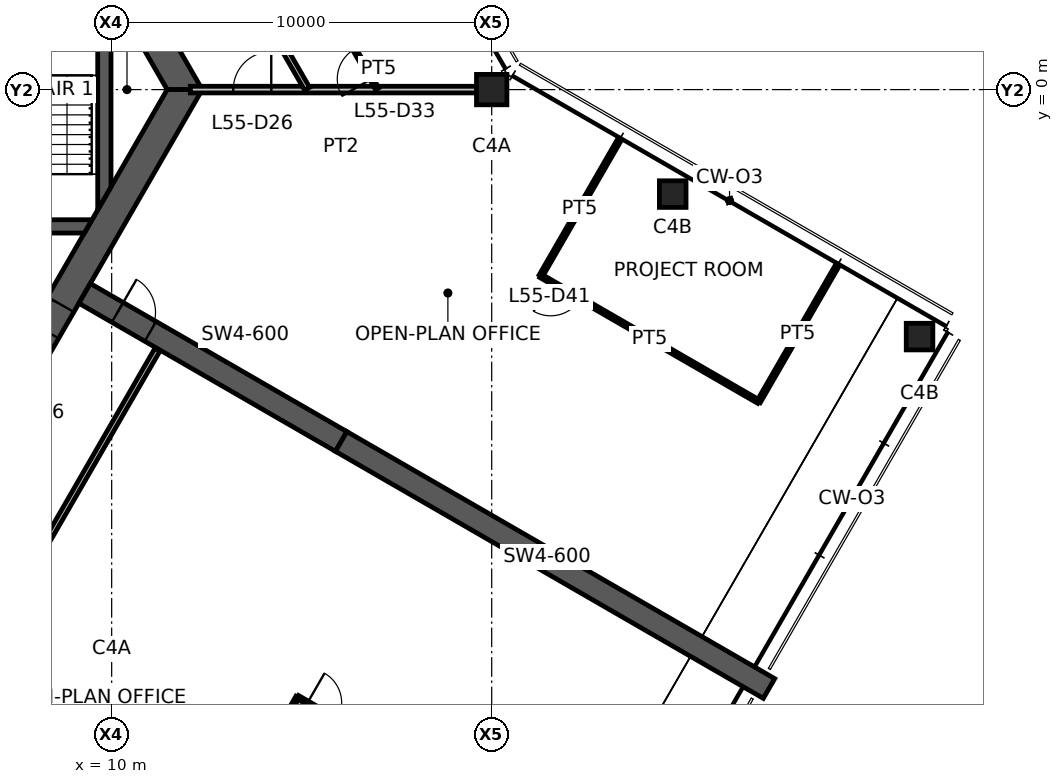
"""IFC4 building model, lengths in metres.
Left out: names, types, materials, properties, quantities, classifications, styles, units other than length and angle.
Written with IfcOpenShell. Run it as: python <this file> out.ifc"""

import sys

from ifc_helpers import new_model, si_unit, direction, frame, frame_2d, origin, origin_2d, place, context, subcontext, project, spatial, polyline, rectangle, hollow_rectangle, outline, extrude, element, fill, save


model = new_model("IFC4")
c1 = context("Model", 3, precision=1e-05, world=origin(), true_north=direction((0.0, 1.0)))
c2 = subcontext(c1, "Body", "Model", "MODEL_VIEW")
j1 = project(units=[si_unit("LENGTHUNIT", "METRE"), si_unit("PLANEANGLEUNIT", "RADIAN")], contexts=[c1])
p1 = place(None, origin())
s1 = spatial("IfcSite", under=j1, at=p1, CompositionType="ELEMENT")
p2 = place(p1, origin())
s2 = spatial("IfcBuilding", under=s1, at=p2, CompositionType="ELEMENT")
p3 = place(p2, frame((0.0, 0.0, 220.6)))
s3 = spatial("IfcBuildingStorey", under=s2, at=p3, CompositionType="ELEMENT", Elevation=220.6)
p4 = place(p3, frame((20.0, 0.0, 0.0), z_axis=(0.0, 0.0, 1.0), x_axis=(1.0, 0.0, 0.0)))
e1 = element("IfcColumn", 1, at=p4, inside=s3, PredefinedType="COLUMN", context=c2, shape_type="SweptSolid", body=[
    extrude(hollow_rectangle(XDim=0.8, YDim=0.8, WallThickness=0.04, at=origin_2d()), origin(), (0.0, 0.0, 1.0), 3.9),
])
for number, where, z_axis, x_axis in (
    (2, (24.763, -2.75, 0.0), (0.0, 0.0, 1.0), (1.0, 0.0, 0.0)),
    (3, (31.258, -6.5, 0.0), (0.0, 0.0, 1.0), (1.0, 0.0, 0.0)),
):
    element("IfcColumn", number, at=place(p3, frame(where, z_axis=z_axis, x_axis=x_axis)), inside=s3, PredefinedType="COLUMN", context=c2, shape_type="SweptSolid", body=[
        extrude(hollow_rectangle(XDim=0.7, YDim=0.7, WallThickness=0.032, at=origin_2d()), origin(), (0.0, 0.0, 1.0), 3.9),
    ])
p5 = place(p3, frame((11.922, 0.0, 0.0), z_axis=(0.0, 0.0, 1.0), x_axis=(-0.500004296715, 0.866022923061, 0.0)))
e4 = element("IfcWall", 4, at=p5, inside=s3, PredefinedType="SHEAR", context=c2, shape_type="SweptSolid", body=[
    extrude(outline(polyline([(-0.231, -0.4), (5.835, -0.4), (6.635, -0.4), (12.153, -0.4), (11.691, 0.4), (6.635, 0.4), (5.835, 0.4), (0.231, 0.4), (-0.231, -0.4)])), origin(), (0.0, 0.0, 1.0), 3.9),
])
p6 = place(p5, frame((5.835, 0.0, 0.0)))
e5 = element("IfcOpeningElement", 5, at=p6, cuts=e4, PredefinedType="OPENING", context=c2, shape_type="SweptSolid", body=[
    extrude(rectangle(XDim=0.8, YDim=2.1, at=frame_2d((0.4, 1.05))), frame((0.0, 0.41, 0.0), z_axis=(0.0, -1.0, 0.0), x_axis=(1.0, 0.0, 0.0)), (0.0, 0.0, 1.0), 0.82),
])
p7 = place(p3, frame((5.961, -10.325, 0.0), z_axis=(0.0, 0.0, 1.0), x_axis=(0.500004296715, 0.866022923061, 0.0)))
e6 = element("IfcWall", 6, at=p7, inside=s3, PredefinedType="SHEAR", context=c2, shape_type="SweptSolid", body=[
    extrude(outline(polyline([(-0.231, -0.4), (4.594, -0.4), (5.394, -0.4), (12.153, -0.4), (11.691, 0.4), (5.394, 0.4), (4.594, 0.4), (0.231, 0.4), (-0.231, -0.4)])), origin(), (0.0, 0.0, 1.0), 3.9),
])
p8 = place(p7, frame((4.594, 0.0, 0.0)))
e7 = element("IfcOpeningElement", 7, at=p8, cuts=e6, PredefinedType="OPENING", context=c2, shape_type="SweptSolid", body=[
    extrude(rectangle(XDim=0.8, YDim=2.1, at=frame_2d((0.4, 1.05))), frame((0.0, 0.41, 0.0), z_axis=(0.0, -1.0, 0.0), x_axis=(1.0, 0.0, 0.0)), (0.0, 0.0, 1.0), 0.82),
])
p9 = place(p3, frame((9.288, -5.363, 0.0), z_axis=(0.0, 0.0, 1.0), x_axis=(0.866031736626, -0.499989031036, 0.0)))
e8 = element("IfcWall", 8, at=p9, inside=s3, PredefinedType="SHEAR", context=c2, shape_type="SweptSolid", body=[
    extrude(rectangle(XDim=7.796, YDim=0.6, at=frame_2d((3.898, 0.0))), origin(), (0.0, 0.0, 1.0), 3.9),
])
p10 = place(p9, frame((1.0, 0.0, 0.0)))
e9 = element("IfcOpeningElement", 9, at=p10, cuts=e8, PredefinedType="OPENING", context=c2, shape_type="SweptSolid", body=[
    extrude(rectangle(XDim=1.0, YDim=2.1, at=frame_2d((0.5, 1.05))), frame((0.0, 0.31, 0.0), z_axis=(0.0, -1.0, 0.0), x_axis=(1.0, 0.0, 0.0)), (0.0, 0.0, 1.0), 0.62),
])
p11 = place(p3, frame((16.039, -9.26, 0.0), z_axis=(0.0, 0.0, 1.0), x_axis=(0.866024837091, -0.50000098154, 0.0)))
e10 = element("IfcWall", 10, at=p11, inside=s3, PredefinedType="SHEAR", context=c2, shape_type="SweptSolid", body=[
    extrude(rectangle(XDim=13.0, YDim=0.6, at=frame_2d((6.5, 0.0))), origin(), (0.0, 0.0, 1.0), 3.9),
])
p12 = place(p3, frame((1.425, -3.6, 0.0), z_axis=(0.0, 0.0, 1.0), x_axis=(1.0, 0.0, 0.0)))
e11 = element("IfcWall", 11, at=p12, inside=s3, PredefinedType="SHEAR", context=c2, shape_type="SweptSolid", body=[
    extrude(outline(polyline([(0.0, -0.175), (1.075, -0.175), (2.175, -0.175), (7.856, -0.175), (8.058, 0.175), (2.175, 0.175), (1.075, 0.175), (0.0, 0.175), (0.0, -0.175)])), origin(), (0.0, 0.0, 1.0), 3.9),
])
p13 = place(p12, frame((1.075, 0.0, 0.0)))
e12 = element("IfcOpeningElement", 12, at=p13, cuts=e11, PredefinedType="OPENING", context=c2, shape_type="SweptSolid", body=[
    extrude(rectangle(XDim=1.1, YDim=2.1, at=frame_2d((0.55, 1.05))), frame((0.0, 0.185, 0.0), z_axis=(0.0, -1.0, 0.0), x_axis=(1.0, 0.0, 0.0)), (0.0, 0.0, 1.0), 0.37),
])
p14 = place(p3, frame((9.808, -2.862, 0.0), z_axis=(0.0, 0.0, 1.0), x_axis=(0.0, 1.0, 0.0)))
e13 = element("IfcWall", 13, at=p14, inside=s3, PredefinedType="SHEAR", context=c2, shape_type="SweptSolid", body=[
    extrude(outline(polyline([(0.303, -0.175), (5.421, -0.175), (6.028, 0.175), (-0.303, 0.175), (0.303, -0.175)])), origin(), (0.0, 0.0, 1.0), 3.9),
])
p15 = place(p3, frame((12.07, 0.0, 0.0), z_axis=(0.0, 0.0, 1.0), x_axis=(1.0, 0.0, 0.0)))
e14 = element("IfcWall", 14, at=p15, inside=s3, PredefinedType="PARTITIONING", context=c2, shape_type="SweptSolid", body=[
    extrude(rectangle(XDim=7.93, YDim=0.175, at=frame_2d((3.965, 0.0))), origin(), (0.0, 0.0, 1.0), 3.05),
])
p16 = place(p15, frame((1.13, 0.0, 0.0)))
e15 = element("IfcOpeningElement", 15, at=p16, cuts=e14, PredefinedType="OPENING", context=c2, shape_type="SweptSolid", body=[
    extrude(rectangle(XDim=1.0, YDim=2.1, at=frame_2d((0.5, 1.05))), frame((0.0, 0.098, 0.0), z_axis=(0.0, -1.0, 0.0), x_axis=(1.0, 0.0, 0.0)), (0.0, 0.0, 1.0), 0.195),
])
p17 = place(p3, frame((10.664, 7.779, 0.0), z_axis=(0.0, 0.0, 1.0), x_axis=(0.49999608499, -0.866027664105, 0.0)))
e16 = element("IfcWall", 16, at=p17, inside=s3, PredefinedType="PARTITIONING", context=c2, shape_type="SweptSolid", body=[
    extrude(rectangle(XDim=8.959, YDim=0.15, at=frame_2d((4.479, 0.0))), origin(), (0.0, 0.0, 1.0), 2.95),
])
p18 = place(p17, frame((3.979, 0.0, 0.0)))
e17 = element("IfcOpeningElement", 17, at=p18, cuts=e16, PredefinedType="OPENING", context=c2, shape_type="SweptSolid", body=[
    extrude(rectangle(XDim=1.0, YDim=2.1, at=frame_2d((0.5, 1.05))), frame((0.0, 0.085, 0.0), z_axis=(0.0, -1.0, 0.0), x_axis=(1.0, 0.0, 0.0)), (0.0, 0.0, 1.0), 0.17),
])
p19 = place(p3, frame((16.986, 0.02, 0.0), z_axis=(0.0, 0.0, 1.0), x_axis=(-0.498096123952, 0.867121820337, 0.0)))
e18 = element("IfcWall", 18, at=p19, inside=s3, PredefinedType="PARTITIONING", context=c2, shape_type="SweptSolid", body=[
    extrude(rectangle(XDim=2.067, YDim=0.1, at=frame_2d((1.034, 0.0))), origin(), (0.0, 0.0, 1.0), 2.95),
])
p20 = place(p19, frame((0.3, 0.0, 0.0)))
e19 = element("IfcOpeningElement", 19, at=p20, cuts=e18, PredefinedType="OPENING", context=c2, shape_type="SweptSolid", body=[
    extrude(rectangle(XDim=0.9, YDim=2.1, at=frame_2d((0.45, 1.05))), frame((0.0, 0.06, 0.0), z_axis=(0.0, -1.0, 0.0), x_axis=(1.0, 0.0, 0.0)), (0.0, 0.0, 1.0), 0.12),
])
p21 = place(p3, frame((21.292, -4.903, 0.0), z_axis=(0.0, 0.0, 1.0), x_axis=(0.500000428765, 0.866025156237, 0.0)))
e20 = element("IfcWall", 20, at=p21, inside=s3, PredefinedType="PARTITIONING", context=c2, shape_type="SweptSolid", body=[
    extrude(rectangle(XDim=4.08, YDim=0.1, at=frame_2d((2.04, 0.0))), origin(), (0.0, 0.0, 1.0), 2.95),
])
p22 = place(p3, frame((27.025, -8.213, 0.0), z_axis=(0.0, 0.0, 1.0), x_axis=(-0.866021597574, 0.500006592492, 0.0)))
e21 = element("IfcWall", 21, at=p22, inside=s3, PredefinedType="PARTITIONING", context=c2, shape_type="SweptSolid", body=[
    extrude(rectangle(XDim=6.62, YDim=0.1, at=frame_2d((3.31, 0.0))), origin(), (0.0, 0.0, 1.0), 2.95),
])
p23 = place(p22, frame((5.42, 0.0, 0.0)))
e22 = element("IfcOpeningElement", 22, at=p23, cuts=e21, PredefinedType="OPENING", context=c2, shape_type="SweptSolid", body=[
    extrude(rectangle(XDim=0.9, YDim=2.1, at=frame_2d((0.45, 1.05))), frame((0.0, 0.06, 0.0), z_axis=(0.0, -1.0, 0.0), x_axis=(1.0, 0.0, 0.0)), (0.0, 0.0, 1.0), 0.12),
])
p24 = place(p3, frame((29.08, -4.653, 0.0), z_axis=(0.0, 0.0, 1.0), x_axis=(-0.500010383074, -0.866019409031, 0.0)))
e23 = element("IfcWall", 23, at=p24, inside=s3, PredefinedType="PARTITIONING", context=c2, shape_type="SweptSolid", body=[
    extrude(rectangle(XDim=4.11, YDim=0.1, at=frame_2d((2.055, 0.0))), origin(), (0.0, 0.0, 1.0), 2.95),
])
p25 = place(p3, frame((11.207, -6.84, 0.0), z_axis=(0.0, 0.0, 1.0), x_axis=(-0.500002959843, -0.866023694911, 0.0)))
e24 = element("IfcWall", 24, at=p25, inside=s3, PredefinedType="PARTITIONING", context=c2, shape_type="SweptSolid", body=[
    extrude(rectangle(XDim=7.258, YDim=0.15, at=frame_2d((3.629, 0.0))), origin(), (0.0, 0.0, 1.0), 2.95),
])
p26 = place(p3, frame((12.837, -19.548, 0.0), z_axis=(0.0, 0.0, 1.0), x_axis=(0.499965833383, 0.866045128991, 0.0)))
e25 = element("IfcWall", 25, at=p26, inside=s3, PredefinedType="PARTITIONING", context=c2, shape_type="SweptSolid", body=[
    extrude(rectangle(XDim=4.11, YDim=0.1, at=frame_2d((2.055, 0.0))), origin(), (0.0, 0.0, 1.0), 2.95),
])
p27 = place(p3, frame((14.892, -15.988, 0.0), z_axis=(0.0, 0.0, 1.0), x_axis=(0.866030817826, -0.499990622488, 0.0)))
e26 = element("IfcWall", 26, at=p27, inside=s3, PredefinedType="PARTITIONING", context=c2, shape_type="SweptSolid", body=[
    extrude(rectangle(XDim=6.62, YDim=0.1, at=frame_2d((3.31, 0.0))), origin(), (0.0, 0.0, 1.0), 2.95),
])
p28 = place(p27, frame((0.3, 0.0, 0.0)))
e27 = element("IfcOpeningElement", 27, at=p28, cuts=e26, PredefinedType="OPENING", context=c2, shape_type="SweptSolid", body=[
    extrude(rectangle(XDim=0.9, YDim=2.1, at=frame_2d((0.45, 1.05))), frame((0.0, 0.06, 0.0), z_axis=(0.0, -1.0, 0.0), x_axis=(1.0, 0.0, 0.0)), (0.0, 0.0, 1.0), 0.12),
])
p29 = place(p8, origin())
e28 = element("IfcDoor", 28, at=p29, inside=s3, OperationType="SINGLE_SWING_LEFT", PredefinedType="DOOR", context=c2, shape_type="SweptSolid", body=[
    extrude(rectangle(XDim=0.8, YDim=2.1, at=frame_2d((0.4, 1.05))), frame((0.0, 0.025, 0.0), z_axis=(0.0, -1.0, 0.0), x_axis=(1.0, 0.0, 0.0)), (0.0, 0.0, 1.0), 0.05),
])
fill(e7, e28)
p30 = place(p10, origin())
e29 = element("IfcDoor", 29, at=p30, inside=s3, OperationType="SINGLE_SWING_LEFT", PredefinedType="DOOR", context=c2, shape_type="SweptSolid", body=[
    extrude(rectangle(XDim=1.0, YDim=2.1, at=frame_2d((0.5, 1.05))), frame((0.0, 0.025, 0.0), z_axis=(0.0, -1.0, 0.0), x_axis=(1.0, 0.0, 0.0)), (0.0, 0.0, 1.0), 0.05),
])
fill(e9, e29)
p31 = place(p16, origin())
e30 = element("IfcDoor", 30, at=p31, inside=s3, OperationType="SINGLE_SWING_RIGHT", PredefinedType="DOOR", context=c2, shape_type="SweptSolid", body=[
    extrude(rectangle(XDim=1.0, YDim=2.1, at=frame_2d((0.5, 1.05))), frame((0.0, 0.025, 0.0), z_axis=(0.0, -1.0, 0.0), x_axis=(1.0, 0.0, 0.0)), (0.0, 0.0, 1.0), 0.05),
])
fill(e15, e30)
p32 = place(p20, origin())
e31 = element("IfcDoor", 31, at=p32, inside=s3, OperationType="SINGLE_SWING_LEFT", PredefinedType="DOOR", context=c2, shape_type="SweptSolid", body=[
    extrude(rectangle(XDim=0.9, YDim=2.1, at=frame_2d((0.45, 1.05))), frame((0.0, 0.025, 0.0), z_axis=(0.0, -1.0, 0.0), x_axis=(1.0, 0.0, 0.0)), (0.0, 0.0, 1.0), 0.05),
])
fill(e19, e31)
p33 = place(p23, origin())
e32 = element("IfcDoor", 32, at=p33, inside=s3, OperationType="SINGLE_SWING_RIGHT", PredefinedType="DOOR", context=c2, shape_type="SweptSolid", body=[
    extrude(rectangle(XDim=0.9, YDim=2.1, at=frame_2d((0.45, 1.05))), frame((0.0, 0.025, 0.0), z_axis=(0.0, -1.0, 0.0), x_axis=(1.0, 0.0, 0.0)), (0.0, 0.0, 1.0), 0.05),
])
fill(e22, e32)
p34 = place(p28, origin())
e33 = element("IfcDoor", 33, at=p34, inside=s3, OperationType="SINGLE_SWING_LEFT", PredefinedType="DOOR", context=c2, shape_type="SweptSolid", body=[
    extrude(rectangle(XDim=0.9, YDim=2.1, at=frame_2d((0.45, 1.05))), frame((0.0, 0.025, 0.0), z_axis=(0.0, -1.0, 0.0), x_axis=(1.0, 0.0, 0.0)), (0.0, 0.0, 1.0), 0.05),
])
fill(e27, e33)
save(model, sys.argv[1])
